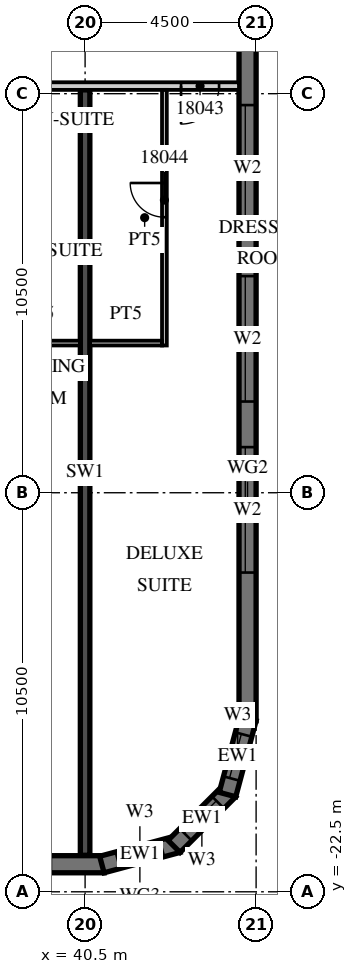
"""IFC4 building model, lengths in metres.
Left out: names, types, materials, properties, quantities, classifications, styles, units other than length and angle.
Written with IfcOpenShell. Run it as: python <this file> out.ifc"""

import sys

from ifc_helpers import new_model, si_unit, direction, frame, frame_2d, origin, place, context, subcontext, project, spatial, polyline, rectangle, outline, extrude, element, fill, save


model = new_model("IFC4")
c1 = context("Model", 3, precision=1e-05, world=origin(), true_north=direction((0.0, 1.0)))
c2 = subcontext(c1, "Body", "Model", "MODEL_VIEW")
j1 = project(units=[si_unit("LENGTHUNIT", "METRE"), si_unit("PLANEANGLEUNIT", "RADIAN")], contexts=[c1])
p1 = place(None, origin())
s1 = spatial("IfcSite", under=j1, at=p1, CompositionType="ELEMENT")
p2 = place(p1, origin())
s2 = spatial("IfcBuilding", under=s1, at=p2, CompositionType="ELEMENT")
p3 = place(p2, frame((0.0, 0.0, 89.7)))
s3 = spatial("IfcBuildingStorey", under=s2, at=p3, CompositionType="ELEMENT", Elevation=89.7)
p4 = place(p3, frame((40.5, -21.54, 0.0), z_axis=(0.0, 0.0, 1.0), x_axis=(0.0, 1.0, 0.0)))
e1 = element("IfcWall", 1, at=p4, inside=s3, PredefinedType="SHEAR", context=c2, shape_type="SweptSolid", body=[
    extrude(rectangle(XDim=20.14, YDim=0.25, at=frame_2d((10.07, 0.0))), origin(), (0.0, 0.0, 1.0), 3.3),
])
p5 = place(p3, frame((-13.5, -21.775, 0.0), z_axis=(0.0, 0.0, 1.0), x_axis=(1.0, 0.0, 0.0)))
e2 = element("IfcWall", 2, at=p5, inside=s3, PredefinedType="SOLIDWALL", context=c2, shape_type="SweptSolid", body=[
    extrude(rectangle(XDim=54.5, YDim=0.45, at=frame_2d((27.25, 0.0))), origin(), (0.0, 0.0, 1.0), 3.02),
])
p6 = place(p5, frame((0.9, 0.0, 0.45)))
e3 = element("IfcOpeningElement", 3, at=p6, cuts=e2, PredefinedType="OPENING", context=c2, shape_type="SweptSolid", body=[
    extrude(rectangle(XDim=2.7, YDim=2.25, at=frame_2d((1.35, 1.125))), frame((0.0, 0.235, 0.0), z_axis=(0.0, -1.0, 0.0), x_axis=(1.0, 0.0, 0.0)), (0.0, 0.0, 1.0), 0.47),
])
p7 = place(p5, frame((5.4, 0.0, 0.45)))
e4 = element("IfcOpeningElement", 4, at=p7, cuts=e2, PredefinedType="OPENING", context=c2, shape_type="SweptSolid", body=[
    extrude(rectangle(XDim=2.7, YDim=2.25, at=frame_2d((1.35, 1.125))), frame((0.0, 0.235, 0.0), z_axis=(0.0, -1.0, 0.0), x_axis=(1.0, 0.0, 0.0)), (0.0, 0.0, 1.0), 0.47),
])
p8 = place(p5, frame((9.9, 0.0, 0.45)))
e5 = element("IfcOpeningElement", 5, at=p8, cuts=e2, PredefinedType="OPENING", context=c2, shape_type="SweptSolid", body=[
    extrude(rectangle(XDim=2.7, YDim=2.25, at=frame_2d((1.35, 1.125))), frame((0.0, 0.235, 0.0), z_axis=(0.0, -1.0, 0.0), x_axis=(1.0, 0.0, 0.0)), (0.0, 0.0, 1.0), 0.47),
])
p9 = place(p5, frame((14.4, 0.0, 0.45)))
e6 = element("IfcOpeningElement", 6, at=p9, cuts=e2, PredefinedType="OPENING", context=c2, shape_type="SweptSolid", body=[
    extrude(rectangle(XDim=2.7, YDim=2.25, at=frame_2d((1.35, 1.125))), frame((0.0, 0.235, 0.0), z_axis=(0.0, -1.0, 0.0), x_axis=(1.0, 0.0, 0.0)), (0.0, 0.0, 1.0), 0.47),
])
p10 = place(p5, frame((18.9, 0.0, 0.45)))
e7 = element("IfcOpeningElement", 7, at=p10, cuts=e2, PredefinedType="OPENING", context=c2, shape_type="SweptSolid", body=[
    extrude(rectangle(XDim=2.7, YDim=2.25, at=frame_2d((1.35, 1.125))), frame((0.0, 0.235, 0.0), z_axis=(0.0, -1.0, 0.0), x_axis=(1.0, 0.0, 0.0)), (0.0, 0.0, 1.0), 0.47),
])
p11 = place(p5, frame((23.4, 0.0, 0.45)))
e8 = element("IfcOpeningElement", 8, at=p11, cuts=e2, PredefinedType="OPENING", context=c2, shape_type="SweptSolid", body=[
    extrude(rectangle(XDim=2.7, YDim=2.25, at=frame_2d((1.35, 1.125))), frame((0.0, 0.235, 0.0), z_axis=(0.0, -1.0, 0.0), x_axis=(1.0, 0.0, 0.0)), (0.0, 0.0, 1.0), 0.47),
])
p12 = place(p5, frame((27.9, 0.0, 0.45)))
e9 = element("IfcOpeningElement", 9, at=p12, cuts=e2, PredefinedType="OPENING", context=c2, shape_type="SweptSolid", body=[
    extrude(rectangle(XDim=2.7, YDim=2.25, at=frame_2d((1.35, 1.125))), frame((0.0, 0.235, 0.0), z_axis=(0.0, -1.0, 0.0), x_axis=(1.0, 0.0, 0.0)), (0.0, 0.0, 1.0), 0.47),
])
p13 = place(p5, frame((32.4, 0.0, 0.45)))
e10 = element("IfcOpeningElement", 10, at=p13, cuts=e2, PredefinedType="OPENING", context=c2, shape_type="SweptSolid", body=[
    extrude(rectangle(XDim=2.7, YDim=2.25, at=frame_2d((1.35, 1.125))), frame((0.0, 0.235, 0.0), z_axis=(0.0, -1.0, 0.0), x_axis=(1.0, 0.0, 0.0)), (0.0, 0.0, 1.0), 0.47),
])
p14 = place(p5, frame((36.9, 0.0, 0.45)))
e11 = element("IfcOpeningElement", 11, at=p14, cuts=e2, PredefinedType="OPENING", context=c2, shape_type="SweptSolid", body=[
    extrude(rectangle(XDim=2.7, YDim=2.25, at=frame_2d((1.35, 1.125))), frame((0.0, 0.235, 0.0), z_axis=(0.0, -1.0, 0.0), x_axis=(1.0, 0.0, 0.0)), (0.0, 0.0, 1.0), 0.47),
])
p15 = place(p5, frame((41.4, 0.0, 0.45)))
e12 = element("IfcOpeningElement", 12, at=p15, cuts=e2, PredefinedType="OPENING", context=c2, shape_type="SweptSolid", body=[
    extrude(rectangle(XDim=2.7, YDim=2.25, at=frame_2d((1.35, 1.125))), frame((0.0, 0.235, 0.0), z_axis=(0.0, -1.0, 0.0), x_axis=(1.0, 0.0, 0.0)), (0.0, 0.0, 1.0), 0.47),
])
p16 = place(p5, frame((45.9, 0.0, 0.45)))
e13 = element("IfcOpeningElement", 13, at=p16, cuts=e2, PredefinedType="OPENING", context=c2, shape_type="SweptSolid", body=[
    extrude(rectangle(XDim=2.7, YDim=2.25, at=frame_2d((1.35, 1.125))), frame((0.0, 0.235, 0.0), z_axis=(0.0, -1.0, 0.0), x_axis=(1.0, 0.0, 0.0)), (0.0, 0.0, 1.0), 0.47),
])
p17 = place(p5, frame((50.4, 0.0, 0.45)))
e14 = element("IfcOpeningElement", 14, at=p17, cuts=e2, PredefinedType="OPENING", context=c2, shape_type="SweptSolid", body=[
    extrude(rectangle(XDim=2.7, YDim=2.25, at=frame_2d((1.35, 1.125))), frame((0.0, 0.235, 0.0), z_axis=(0.0, -1.0, 0.0), x_axis=(1.0, 0.0, 0.0)), (0.0, 0.0, 1.0), 0.47),
])
p18 = place(p3, frame((40.942, -21.783, 0.0), z_axis=(0.0, 0.0, 1.0), x_axis=(0.965926999034, 0.25881466832, 0.0)))
e15 = element("IfcWall", 15, at=p18, inside=s3, PredefinedType="SOLIDWALL", context=c2, shape_type="SweptSolid", body=[
    extrude(outline(polyline([(0.0, -0.225), (2.071, -0.225), (1.95, 0.225), (0.121, 0.225), (0.0, -0.225)])), origin(), (0.0, 0.0, 1.0), 3.02),
])
p19 = place(p18, frame((0.435, 0.0, 0.45)))
e16 = element("IfcOpeningElement", 16, at=p19, cuts=e15, PredefinedType="OPENING", context=c2, shape_type="SweptSolid", body=[
    extrude(rectangle(XDim=1.2, YDim=2.25, at=frame_2d((0.6, 1.125))), frame((0.0, 0.235, 0.0), z_axis=(0.0, -1.0, 0.0), x_axis=(1.0, 0.0, 0.0)), (0.0, 0.0, 1.0), 0.47),
])
p20 = place(p3, frame((42.841, -21.305, 0.0), z_axis=(0.0, 0.0, 1.0), x_axis=(0.707106781187, 0.707106781187, 0.0)))
e17 = element("IfcWall", 17, at=p20, inside=s3, PredefinedType="SOLIDWALL", context=c2, shape_type="SweptSolid", body=[
    extrude(outline(polyline([(0.0, -0.225), (2.071, -0.225), (1.95, 0.225), (0.121, 0.225), (0.0, -0.225)])), origin(), (0.0, 0.0, 1.0), 3.02),
])
p21 = place(p20, frame((0.435, 0.0, 0.45)))
e18 = element("IfcOpeningElement", 18, at=p21, cuts=e17, PredefinedType="OPENING", context=c2, shape_type="SweptSolid", body=[
    extrude(rectangle(XDim=1.2, YDim=2.25, at=frame_2d((0.6, 1.125))), frame((0.0, 0.235, 0.0), z_axis=(0.0, -1.0, 0.0), x_axis=(1.0, 0.0, 0.0)), (0.0, 0.0, 1.0), 0.47),
])
p22 = place(p3, frame((44.247, -19.942, 0.0), z_axis=(0.0, 0.0, 1.0), x_axis=(0.25881466832, 0.965926999034, 0.0)))
e19 = element("IfcWall", 19, at=p22, inside=s3, PredefinedType="SOLIDWALL", context=c2, shape_type="SweptSolid", body=[
    extrude(outline(polyline([(-0.0, -0.225), (2.07, -0.225), (1.95, 0.225), (0.12, 0.225), (-0.0, -0.225)])), origin(), (0.0, 0.0, 1.0), 3.02),
])
p23 = place(p22, frame((0.435, 0.0, 0.45)))
e20 = element("IfcOpeningElement", 20, at=p23, cuts=e19, PredefinedType="OPENING", context=c2, shape_type="SweptSolid", body=[
    extrude(rectangle(XDim=1.2, YDim=2.25, at=frame_2d((0.6, 1.125))), frame((0.0, 0.235, 0.0), z_axis=(0.0, -1.0, 0.0), x_axis=(1.0, 0.0, 0.0)), (0.0, 0.0, 1.0), 0.47),
])
p24 = place(p3, frame((44.775, -18.0, 0.0), z_axis=(0.0, 0.0, 1.0), x_axis=(0.0, 1.0, 0.0)))
e21 = element("IfcWall", 21, at=p24, inside=s3, PredefinedType="SOLIDWALL", context=c2, shape_type="SweptSolid", body=[
    extrude(rectangle(XDim=36.0, YDim=0.45, at=frame_2d((18.0, 0.0))), origin(), (0.0, 0.0, 1.0), 3.02),
])
p25 = place(p24, frame((3.9, 0.0, 0.45)))
e22 = element("IfcOpeningElement", 22, at=p25, cuts=e21, PredefinedType="OPENING", context=c2, shape_type="SweptSolid", body=[
    extrude(rectangle(XDim=3.3, YDim=2.25, at=frame_2d((1.65, 1.125))), frame((0.0, 0.235, 0.0), z_axis=(0.0, -1.0, 0.0), x_axis=(1.0, 0.0, 0.0)), (0.0, 0.0, 1.0), 0.47),
])
p26 = place(p24, frame((8.4, 0.0, 0.45)))
e23 = element("IfcOpeningElement", 23, at=p26, cuts=e21, PredefinedType="OPENING", context=c2, shape_type="SweptSolid", body=[
    extrude(rectangle(XDim=3.3, YDim=2.25, at=frame_2d((1.65, 1.125))), frame((0.0, 0.235, 0.0), z_axis=(0.0, -1.0, 0.0), x_axis=(1.0, 0.0, 0.0)), (0.0, 0.0, 1.0), 0.47),
])
p27 = place(p24, frame((12.9, 0.0, 0.45)))
e24 = element("IfcOpeningElement", 24, at=p27, cuts=e21, PredefinedType="OPENING", context=c2, shape_type="SweptSolid", body=[
    extrude(rectangle(XDim=3.3, YDim=2.25, at=frame_2d((1.65, 1.125))), frame((0.0, 0.235, 0.0), z_axis=(0.0, -1.0, 0.0), x_axis=(1.0, 0.0, 0.0)), (0.0, 0.0, 1.0), 0.47),
])
p28 = place(p3, frame((-13.5, -1.3, 0.0), z_axis=(0.0, 0.0, 1.0), x_axis=(1.0, 0.0, 0.0)))
e25 = element("IfcWall", 25, at=p28, inside=s3, PredefinedType="PARTITIONING", context=c2, shape_type="SweptSolid", body=[
    extrude(rectangle(XDim=58.05, YDim=0.2, at=frame_2d((29.025, 0.0))), origin(), (0.0, 0.0, 1.0), 3.02),
])
p29 = place(p28, frame((2.925, 0.0, 0.0)))
e26 = element("IfcOpeningElement", 26, at=p29, cuts=e25, PredefinedType="OPENING", context=c2, shape_type="SweptSolid", body=[
    extrude(rectangle(XDim=1.0, YDim=2.1, at=frame_2d((0.5, 1.05))), frame((0.0, 0.11, 0.0), z_axis=(0.0, -1.0, 0.0), x_axis=(1.0, 0.0, 0.0)), (0.0, 0.0, 1.0), 0.22),
])
p30 = place(p28, frame((5.075, 0.0, 0.0)))
e27 = element("IfcOpeningElement", 27, at=p30, cuts=e25, PredefinedType="OPENING", context=c2, shape_type="SweptSolid", body=[
    extrude(rectangle(XDim=1.0, YDim=2.1, at=frame_2d((0.5, 1.05))), frame((0.0, 0.11, 0.0), z_axis=(0.0, -1.0, 0.0), x_axis=(1.0, 0.0, 0.0)), (0.0, 0.0, 1.0), 0.22),
])
p31 = place(p28, frame((9.55, 0.0, 0.0)))
e28 = element("IfcOpeningElement", 28, at=p31, cuts=e25, PredefinedType="OPENING", context=c2, shape_type="SweptSolid", body=[
    extrude(rectangle(XDim=1.0, YDim=2.1, at=frame_2d((0.5, 1.05))), frame((0.0, 0.11, 0.0), z_axis=(0.0, -1.0, 0.0), x_axis=(1.0, 0.0, 0.0)), (0.0, 0.0, 1.0), 0.22),
])
p32 = place(p28, frame((14.075, 0.0, 0.0)))
e29 = element("IfcOpeningElement", 29, at=p32, cuts=e25, PredefinedType="OPENING", context=c2, shape_type="SweptSolid", body=[
    extrude(rectangle(XDim=1.0, YDim=2.1, at=frame_2d((0.5, 1.05))), frame((0.0, 0.11, 0.0), z_axis=(0.0, -1.0, 0.0), x_axis=(1.0, 0.0, 0.0)), (0.0, 0.0, 1.0), 0.22),
])
p33 = place(p28, frame((20.925, 0.0, 0.0)))
e30 = element("IfcOpeningElement", 30, at=p33, cuts=e25, PredefinedType="OPENING", context=c2, shape_type="SweptSolid", body=[
    extrude(rectangle(XDim=1.0, YDim=2.1, at=frame_2d((0.5, 1.05))), frame((0.0, 0.11, 0.0), z_axis=(0.0, -1.0, 0.0), x_axis=(1.0, 0.0, 0.0)), (0.0, 0.0, 1.0), 0.22),
])
p34 = place(p28, frame((27.862, 0.0, 0.0)))
e31 = element("IfcOpeningElement", 31, at=p34, cuts=e25, PredefinedType="OPENING", context=c2, shape_type="SweptSolid", body=[
    extrude(rectangle(XDim=1.2, YDim=2.1, at=frame_2d((0.6, 1.05))), frame((0.0, 0.11, 0.0), z_axis=(0.0, -1.0, 0.0), x_axis=(1.0, 0.0, 0.0)), (0.0, 0.0, 1.0), 0.22),
])
p35 = place(p28, frame((34.45, 0.0, 0.0)))
e32 = element("IfcOpeningElement", 32, at=p35, cuts=e25, PredefinedType="OPENING", context=c2, shape_type="SweptSolid", body=[
    extrude(rectangle(XDim=1.0, YDim=2.1, at=frame_2d((0.5, 1.05))), frame((0.0, 0.11, 0.0), z_axis=(0.0, -1.0, 0.0), x_axis=(1.0, 0.0, 0.0)), (0.0, 0.0, 1.0), 0.22),
])
p36 = place(p28, frame((38.925, 0.0, 0.0)))
e33 = element("IfcOpeningElement", 33, at=p36, cuts=e25, PredefinedType="OPENING", context=c2, shape_type="SweptSolid", body=[
    extrude(rectangle(XDim=1.0, YDim=2.1, at=frame_2d((0.5, 1.05))), frame((0.0, 0.11, 0.0), z_axis=(0.0, -1.0, 0.0), x_axis=(1.0, 0.0, 0.0)), (0.0, 0.0, 1.0), 0.22),
])
p37 = place(p28, frame((41.075, 0.0, 0.0)))
e34 = element("IfcOpeningElement", 34, at=p37, cuts=e25, PredefinedType="OPENING", context=c2, shape_type="SweptSolid", body=[
    extrude(rectangle(XDim=1.0, YDim=2.1, at=frame_2d((0.5, 1.05))), frame((0.0, 0.11, 0.0), z_axis=(0.0, -1.0, 0.0), x_axis=(1.0, 0.0, 0.0)), (0.0, 0.0, 1.0), 0.22),
])
p38 = place(p28, frame((45.55, 0.0, 0.0)))
e35 = element("IfcOpeningElement", 35, at=p38, cuts=e25, PredefinedType="OPENING", context=c2, shape_type="SweptSolid", body=[
    extrude(rectangle(XDim=1.0, YDim=2.1, at=frame_2d((0.5, 1.05))), frame((0.0, 0.11, 0.0), z_axis=(0.0, -1.0, 0.0), x_axis=(1.0, 0.0, 0.0)), (0.0, 0.0, 1.0), 0.22),
])
p39 = place(p28, frame((50.075, 0.0, 0.0)))
e36 = element("IfcOpeningElement", 36, at=p39, cuts=e25, PredefinedType="OPENING", context=c2, shape_type="SweptSolid", body=[
    extrude(rectangle(XDim=1.0, YDim=2.1, at=frame_2d((0.5, 1.05))), frame((0.0, 0.11, 0.0), z_axis=(0.0, -1.0, 0.0), x_axis=(1.0, 0.0, 0.0)), (0.0, 0.0, 1.0), 0.22),
])
p40 = place(p28, frame((56.525, 0.0, 0.0)))
e37 = element("IfcOpeningElement", 37, at=p40, cuts=e25, PredefinedType="OPENING", context=c2, shape_type="SweptSolid", body=[
    extrude(rectangle(XDim=1.0, YDim=2.1, at=frame_2d((0.5, 1.05))), frame((0.0, 0.11, 0.0), z_axis=(0.0, -1.0, 0.0), x_axis=(1.0, 0.0, 0.0)), (0.0, 0.0, 1.0), 0.22),
])
p41 = place(p3, frame((38.15, -8.062, 0.0), z_axis=(0.0, 0.0, 1.0), x_axis=(1.0, 0.0, 0.0)))
e38 = element("IfcWall", 38, at=p41, inside=s3, PredefinedType="PARTITIONING", context=c2, shape_type="SweptSolid", body=[
    extrude(rectangle(XDim=2.225, YDim=0.125, at=frame_2d((1.113, 0.0))), origin(), (0.0, 0.0, 1.0), 3.02),
])
p42 = place(p3, frame((42.587, -8.125, 0.0), z_axis=(0.0, 0.0, 1.0), x_axis=(0.0, 1.0, 0.0)))
e39 = element("IfcWall", 39, at=p42, inside=s3, PredefinedType="PARTITIONING", context=c2, shape_type="SweptSolid", body=[
    extrude(rectangle(XDim=6.725, YDim=0.125, at=frame_2d((3.363, 0.0))), origin(), (0.0, 0.0, 1.0), 3.02),
])
p43 = place(p42, frame((3.375, 0.0, 0.0)))
e40 = element("IfcOpeningElement", 40, at=p43, cuts=e39, PredefinedType="OPENING", context=c2, shape_type="SweptSolid", body=[
    extrude(rectangle(XDim=0.9, YDim=2.1, at=frame_2d((0.45, 1.05))), frame((0.0, 0.073, 0.0), z_axis=(0.0, -1.0, 0.0), x_axis=(1.0, 0.0, 0.0)), (0.0, 0.0, 1.0), 0.145),
])
p44 = place(p3, frame((40.625, -8.062, 0.0), z_axis=(0.0, 0.0, 1.0), x_axis=(1.0, 0.0, 0.0)))
e41 = element("IfcWall", 41, at=p44, inside=s3, PredefinedType="PARTITIONING", context=c2, shape_type="SweptSolid", body=[
    extrude(rectangle(XDim=1.9, YDim=0.125, at=frame_2d((0.95, 0.0))), origin(), (0.0, 0.0, 1.0), 3.02),
])
p45 = place(p19, origin())
e42 = element("IfcWindow", 42, at=p45, inside=s3, PartitioningType="SINGLE_PANEL", PredefinedType="WINDOW", context=c2, shape_type="SweptSolid", body=[
    extrude(rectangle(XDim=1.2, YDim=2.25, at=frame_2d((0.6, 1.125))), frame((0.0, 0.09, 0.0), z_axis=(0.0, -1.0, 0.0), x_axis=(1.0, 0.0, 0.0)), (0.0, 0.0, 1.0), 0.06),
])
fill(e16, e42)
p46 = place(p21, origin())
e43 = element("IfcWindow", 43, at=p46, inside=s3, PartitioningType="SINGLE_PANEL", PredefinedType="WINDOW", context=c2, shape_type="SweptSolid", body=[
    extrude(rectangle(XDim=1.2, YDim=2.25, at=frame_2d((0.6, 1.125))), frame((0.0, 0.09, 0.0), z_axis=(0.0, -1.0, 0.0), x_axis=(1.0, 0.0, 0.0)), (0.0, 0.0, 1.0), 0.06),
])
fill(e18, e43)
p47 = place(p23, origin())
e44 = element("IfcWindow", 44, at=p47, inside=s3, PartitioningType="SINGLE_PANEL", PredefinedType="WINDOW", context=c2, shape_type="SweptSolid", body=[
    extrude(rectangle(XDim=1.2, YDim=2.25, at=frame_2d((0.6, 1.125))), frame((0.0, 0.09, 0.0), z_axis=(0.0, -1.0, 0.0), x_axis=(1.0, 0.0, 0.0)), (0.0, 0.0, 1.0), 0.06),
])
fill(e20, e44)
p48 = place(p25, origin())
e45 = element("IfcWindow", 45, at=p48, inside=s3, PartitioningType="SINGLE_PANEL", PredefinedType="WINDOW", context=c2, shape_type="SweptSolid", body=[
    extrude(rectangle(XDim=3.3, YDim=2.25, at=frame_2d((1.65, 1.125))), frame((0.0, 0.09, 0.0), z_axis=(0.0, -1.0, 0.0), x_axis=(1.0, 0.0, 0.0)), (0.0, 0.0, 1.0), 0.06),
])
fill(e22, e45)
p49 = place(p26, origin())
e46 = element("IfcWindow", 46, at=p49, inside=s3, PartitioningType="SINGLE_PANEL", PredefinedType="WINDOW", context=c2, shape_type="SweptSolid", body=[
    extrude(rectangle(XDim=3.3, YDim=2.25, at=frame_2d((1.65, 1.125))), frame((0.0, 0.09, 0.0), z_axis=(0.0, -1.0, 0.0), x_axis=(1.0, 0.0, 0.0)), (0.0, 0.0, 1.0), 0.06),
])
fill(e23, e46)
p50 = place(p27, origin())
e47 = element("IfcWindow", 47, at=p50, inside=s3, PartitioningType="SINGLE_PANEL", PredefinedType="WINDOW", context=c2, shape_type="SweptSolid", body=[
    extrude(rectangle(XDim=3.3, YDim=2.25, at=frame_2d((1.65, 1.125))), frame((0.0, 0.09, 0.0), z_axis=(0.0, -1.0, 0.0), x_axis=(1.0, 0.0, 0.0)), (0.0, 0.0, 1.0), 0.06),
])
fill(e24, e47)
p51 = place(p40, origin())
e48 = element("IfcDoor", 48, at=p51, inside=s3, OperationType="SINGLE_SWING_LEFT", PredefinedType="DOOR", context=c2, shape_type="SweptSolid", body=[
    extrude(rectangle(XDim=1.0, YDim=2.1, at=frame_2d((0.5, 1.05))), frame((0.0, 0.025, 0.0), z_axis=(0.0, -1.0, 0.0), x_axis=(1.0, 0.0, 0.0)), (0.0, 0.0, 1.0), 0.05),
])
fill(e37, e48)
p52 = place(p43, origin())
e49 = element("IfcDoor", 49, at=p52, inside=s3, OperationType="SINGLE_SWING_RIGHT", PredefinedType="DOOR", context=c2, shape_type="SweptSolid", body=[
    extrude(rectangle(XDim=0.9, YDim=2.1, at=frame_2d((0.45, 1.05))), frame((0.0, 0.025, 0.0), z_axis=(0.0, -1.0, 0.0), x_axis=(1.0, 0.0, 0.0)), (0.0, 0.0, 1.0), 0.05),
])
fill(e40, e49)
save(model, sys.argv[1])
